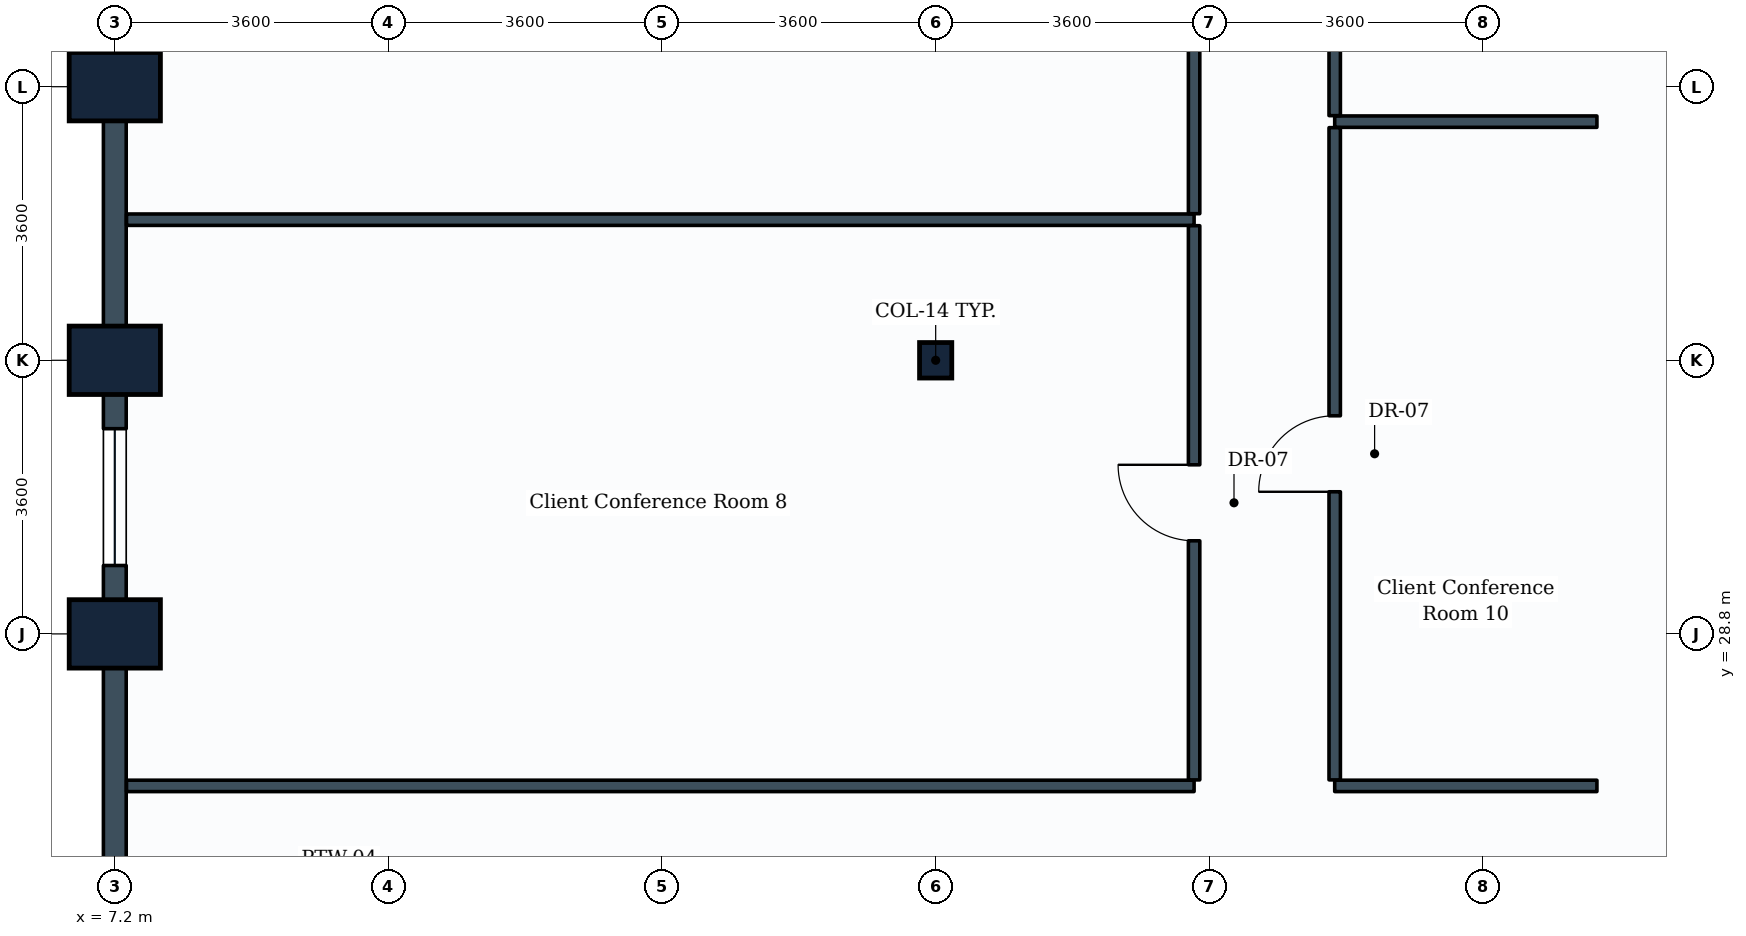
"""IFC4 building model, lengths in metres.
Left out: names, types, materials, properties, quantities, classifications, styles, units other than length and angle.
Written with IfcOpenShell. Run it as: python <this file> out.ifc"""

import sys

from ifc_helpers import new_model, si_unit, direction, frame, frame_2d, origin, origin_2d, place, context, subcontext, project, spatial, rectangle, i_section, extrude, element, fill, save


model = new_model("IFC4")
c1 = context("Model", 3, precision=1e-05, world=origin(), true_north=direction((0.0, 1.0)))
c2 = subcontext(c1, "Body", "Model", "MODEL_VIEW")
j1 = project(units=[si_unit("LENGTHUNIT", "METRE"), si_unit("PLANEANGLEUNIT", "RADIAN")], contexts=[c1])
p1 = place(None, origin())
s1 = spatial("IfcSite", under=j1, at=p1, CompositionType="ELEMENT")
p2 = place(p1, origin())
s2 = spatial("IfcBuilding", under=s1, at=p2, CompositionType="ELEMENT")
p3 = place(p2, frame((0.0, 0.0, 39.6)))
s3 = spatial("IfcBuildingStorey", under=s2, at=p3, CompositionType="ELEMENT", Elevation=39.6)
for number, where, z_axis, x_axis in (
    (1, (7.2, 28.8, 0.0), (0.0, 0.0, 1.0), (0.0, 1.0, 0.0)),
    (2, (7.2, 32.4, 0.0), (0.0, 0.0, 1.0), (0.0, 1.0, 0.0)),
    (3, (7.2, 36.0, 0.0), (0.0, 0.0, 1.0), (0.0, 1.0, 0.0)),
):
    element("IfcColumn", number, at=place(p3, frame(where, z_axis=z_axis, x_axis=x_axis)), inside=s3, PredefinedType="COLUMN", context=c2, shape_type="SweptSolid", body=[
        extrude(rectangle(XDim=0.9, YDim=1.2, at=origin_2d()), origin(), (0.0, 0.0, 1.0), 3.9),
    ])
p4 = place(p3, frame((18.0, 32.4, 0.0), z_axis=(0.0, 0.0, 1.0), x_axis=(1.0, 0.0, 0.0)))
e4 = element("IfcColumn", 4, at=p4, inside=s3, PredefinedType="COLUMN", context=c2, shape_type="SweptSolid", body=[
    extrude(i_section(OverallWidth=0.424, OverallDepth=0.467, WebThickness=0.033, FlangeThickness=0.053, FilletRadius=0.015, at=origin_2d()), origin(), (0.0, 0.0, 1.0), 3.9),
])
p5 = place(p3, frame((7.2, 36.0, 0.0), z_axis=(0.0, 0.0, 1.0), x_axis=(0.0, 1.0, 0.0)))
e5 = element("IfcWall", 5, at=p5, inside=s3, PredefinedType="STANDARD", context=c2, shape_type="SweptSolid", body=[
    extrude(rectangle(XDim=3.6, YDim=0.3, at=frame_2d((1.8, 0.0))), origin(), (0.0, 0.0, 1.0), 2.93),
])
p6 = place(p5, frame((0.9, 0.0, 0.85)))
e6 = element("IfcOpeningElement", 6, at=p6, cuts=e5, PredefinedType="OPENING", context=c2, shape_type="SweptSolid", body=[
    extrude(rectangle(XDim=1.8, YDim=1.35, at=frame_2d((0.9, 0.675))), frame((0.0, 0.16, 0.0), z_axis=(0.0, -1.0, 0.0), x_axis=(1.0, 0.0, 0.0)), (0.0, 0.0, 1.0), 0.32),
])
p7 = place(p3, frame((7.2, 32.4, 0.0), z_axis=(0.0, 0.0, 1.0), x_axis=(0.0, 1.0, 0.0)))
e7 = element("IfcWall", 7, at=p7, inside=s3, PredefinedType="STANDARD", context=c2, shape_type="SweptSolid", body=[
    extrude(rectangle(XDim=3.6, YDim=0.3, at=frame_2d((1.8, 0.0))), origin(), (0.0, 0.0, 1.0), 2.93),
])
p8 = place(p3, frame((7.2, 28.8, 0.0), z_axis=(0.0, 0.0, 1.0), x_axis=(0.0, 1.0, 0.0)))
e8 = element("IfcWall", 8, at=p8, inside=s3, PredefinedType="STANDARD", context=c2, shape_type="SweptSolid", body=[
    extrude(rectangle(XDim=3.6, YDim=0.3, at=frame_2d((1.8, 0.0))), origin(), (0.0, 0.0, 1.0), 2.93),
])
p9 = place(p8, frame((0.9, 0.0, 0.85)))
e9 = element("IfcOpeningElement", 9, at=p9, cuts=e8, PredefinedType="OPENING", context=c2, shape_type="SweptSolid", body=[
    extrude(rectangle(XDim=1.8, YDim=1.35, at=frame_2d((0.9, 0.675))), frame((0.0, 0.16, 0.0), z_axis=(0.0, -1.0, 0.0), x_axis=(1.0, 0.0, 0.0)), (0.0, 0.0, 1.0), 0.32),
])
p10 = place(p3, frame((7.2, 25.2, 0.0), z_axis=(0.0, 0.0, 1.0), x_axis=(0.0, 1.0, 0.0)))
e10 = element("IfcWall", 10, at=p10, inside=s3, PredefinedType="STANDARD", context=c2, shape_type="SweptSolid", body=[
    extrude(rectangle(XDim=3.6, YDim=0.3, at=frame_2d((1.8, 0.0))), origin(), (0.0, 0.0, 1.0), 2.93),
])
for number, where, z_axis, x_axis in (
    (11, (7.354, 26.8, 0.0), (0.0, 0.0, 1.0), (1.0, 0.0, 0.0)),
    (12, (7.354, 34.25, 0.0), (0.0, 0.0, 1.0), (1.0, 0.0, 0.0)),
):
    element("IfcWall", number, at=place(p3, frame(where, z_axis=z_axis, x_axis=x_axis)), inside=s3, PredefinedType="PARTITIONING", context=c2, shape_type="SweptSolid", body=[
        extrude(rectangle(XDim=14.046, YDim=0.15, at=frame_2d((7.023, 0.0))), origin(), (0.0, 0.0, 1.0), 2.93),
    ])
p11 = place(p3, frame((21.4, 26.879, 0.0), z_axis=(0.0, 0.0, 1.0), x_axis=(0.0, 1.0, 0.0)))
e13 = element("IfcWall", 13, at=p11, inside=s3, PredefinedType="PARTITIONING", context=c2, shape_type="SweptSolid", body=[
    extrude(rectangle(XDim=7.292, YDim=0.15, at=frame_2d((3.646, 0.0))), origin(), (0.0, 0.0, 1.0), 3.08),
])
p12 = place(p11, frame((3.146, 0.0, 0.0)))
e14 = element("IfcOpeningElement", 14, at=p12, cuts=e13, PredefinedType="OPENING", context=c2, shape_type="SweptSolid", body=[
    extrude(rectangle(XDim=1.0, YDim=2.1, at=frame_2d((0.5, 1.05))), frame((0.0, 0.085, 0.0), z_axis=(0.0, -1.0, 0.0), x_axis=(1.0, 0.0, 0.0)), (0.0, 0.0, 1.0), 0.17),
])
p13 = place(p3, frame((21.4, 34.329, 0.0), z_axis=(0.0, 0.0, 1.0), x_axis=(0.0, 1.0, 0.0)))
e15 = element("IfcWall", 15, at=p13, inside=s3, PredefinedType="PARTITIONING", context=c2, shape_type="SweptSolid", body=[
    extrude(rectangle(XDim=10.671, YDim=0.15, at=frame_2d((5.335, 0.0))), origin(), (0.0, 0.0, 1.0), 3.03),
])
p14 = place(p13, frame((3.637, 0.0, 0.0)))
e16 = element("IfcOpeningElement", 16, at=p14, cuts=e15, PredefinedType="OPENING", context=c2, shape_type="SweptSolid", body=[
    extrude(rectangle(XDim=1.0, YDim=2.1, at=frame_2d((0.5, 1.05))), frame((0.0, 0.085, 0.0), z_axis=(0.0, -1.0, 0.0), x_axis=(1.0, 0.0, 0.0)), (0.0, 0.0, 1.0), 0.17),
])
p15 = place(p3, frame((23.25, 26.8, 0.0), z_axis=(0.0, 0.0, 1.0), x_axis=(1.0, 0.0, 0.0)))
e17 = element("IfcWall", 17, at=p15, inside=s3, PredefinedType="PARTITIONING", context=c2, shape_type="SweptSolid", body=[
    extrude(rectangle(XDim=3.45, YDim=0.15, at=frame_2d((1.725, 0.0))), origin(), (0.0, 0.0, 1.0), 3.635),
])
p16 = place(p3, frame((23.25, 35.54, 0.0), z_axis=(0.0, 0.0, 1.0), x_axis=(1.0, 0.0, 0.0)))
e18 = element("IfcWall", 18, at=p16, inside=s3, PredefinedType="PARTITIONING", context=c2, shape_type="SweptSolid", body=[
    extrude(rectangle(XDim=3.45, YDim=0.15, at=frame_2d((1.725, 0.0))), origin(), (0.0, 0.0, 1.0), 3.03),
])
p17 = place(p3, frame((23.25, 26.879, 0.0), z_axis=(0.0, 0.0, 1.0), x_axis=(0.0, 1.0, 0.0)))
e19 = element("IfcWall", 19, at=p17, inside=s3, PredefinedType="PARTITIONING", context=c2, shape_type="SweptSolid", body=[
    extrude(rectangle(XDim=8.582, YDim=0.15, at=frame_2d((4.291, 0.0))), origin(), (0.0, 0.0, 1.0), 3.08),
])
p18 = place(p17, frame((3.791, 0.0, 0.0)))
e20 = element("IfcOpeningElement", 20, at=p18, cuts=e19, PredefinedType="OPENING", context=c2, shape_type="SweptSolid", body=[
    extrude(rectangle(XDim=1.0, YDim=2.1, at=frame_2d((0.5, 1.05))), frame((0.0, 0.085, 0.0), z_axis=(0.0, -1.0, 0.0), x_axis=(1.0, 0.0, 0.0)), (0.0, 0.0, 1.0), 0.17),
])
p19 = place(p3, frame((23.25, 35.619, 0.0), z_axis=(0.0, 0.0, 1.0), x_axis=(0.0, 1.0, 0.0)))
e21 = element("IfcWall", 21, at=p19, inside=s3, PredefinedType="PARTITIONING", context=c2, shape_type="SweptSolid", body=[
    extrude(rectangle(XDim=9.381, YDim=0.15, at=frame_2d((4.69, 0.0))), origin(), (0.0, 0.0, 1.0), 3.08),
])
p20 = place(p19, frame((4.111, 0.0, 0.0)))
e22 = element("IfcOpeningElement", 22, at=p20, cuts=e21, PredefinedType="OPENING", context=c2, shape_type="SweptSolid", body=[
    extrude(rectangle(XDim=1.0, YDim=2.1, at=frame_2d((0.5, 1.05))), frame((0.0, 0.085, 0.0), z_axis=(0.0, -1.0, 0.0), x_axis=(1.0, 0.0, 0.0)), (0.0, 0.0, 1.0), 0.17),
])
p21 = place(p9, origin())
e23 = element("IfcWindow", 23, at=p21, inside=s3, PartitioningType="SINGLE_PANEL", PredefinedType="WINDOW", context=c2, shape_type="SweptSolid", body=[
    extrude(rectangle(XDim=1.8, YDim=1.35, at=frame_2d((0.9, 0.675))), frame((0.0, 0.03, 0.0), z_axis=(0.0, -1.0, 0.0), x_axis=(1.0, 0.0, 0.0)), (0.0, 0.0, 1.0), 0.06),
])
fill(e9, e23)
p22 = place(p12, origin())
e24 = element("IfcDoor", 24, at=p22, inside=s3, OperationType="SINGLE_SWING_RIGHT", PredefinedType="DOOR", context=c2, shape_type="SweptSolid", body=[
    extrude(rectangle(XDim=1.0, YDim=2.1, at=frame_2d((0.5, 1.05))), frame((0.0, 0.025, 0.0), z_axis=(0.0, -1.0, 0.0), x_axis=(1.0, 0.0, 0.0)), (0.0, 0.0, 1.0), 0.05),
])
fill(e14, e24)
p23 = place(p18, origin())
e25 = element("IfcDoor", 25, at=p23, inside=s3, OperationType="SINGLE_SWING_LEFT", PredefinedType="DOOR", context=c2, shape_type="SweptSolid", body=[
    extrude(rectangle(XDim=1.0, YDim=2.1, at=frame_2d((0.5, 1.05))), frame((0.0, 0.025, 0.0), z_axis=(0.0, -1.0, 0.0), x_axis=(1.0, 0.0, 0.0)), (0.0, 0.0, 1.0), 0.05),
])
fill(e20, e25)
save(model, sys.argv[1])
